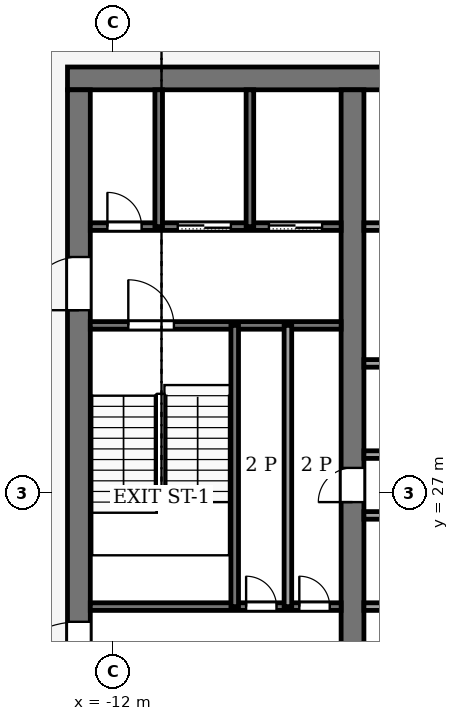
"""IFC4 building model, lengths in metres.
Left out: names, types, materials, properties, quantities, classifications, styles, units other than length and angle.
Written with IfcOpenShell. Run it as: python <this file> out.ifc"""

import sys

from ifc_helpers import new_model, si_unit, direction, frame, frame_2d, origin, place, context, subcontext, project, spatial, rectangle, extrude, element, fill, save


model = new_model("IFC4")
c1 = context("Model", 3, precision=1e-05, world=origin(), true_north=direction((0.0, 1.0)))
c2 = subcontext(c1, "Body", "Model", "MODEL_VIEW")
j1 = project(units=[si_unit("LENGTHUNIT", "METRE"), si_unit("PLANEANGLEUNIT", "RADIAN")], contexts=[c1])
p1 = place(None, origin())
s1 = spatial("IfcSite", under=j1, at=p1, CompositionType="ELEMENT")
p2 = place(p1, origin())
s2 = spatial("IfcBuilding", under=s1, at=p2, CompositionType="ELEMENT")
p3 = place(p2, frame((0.0, 0.0, 314.0)))
s3 = spatial("IfcBuildingStorey", under=s2, at=p3, CompositionType="ELEMENT", Elevation=314.0)
p4 = place(p3, frame((-13.2, 37.9, -0.13), z_axis=(0.0, 0.0, 1.0), x_axis=(1.0, 0.0, 0.0)))
e1 = element("IfcWall", 1, at=p4, inside=s3, PredefinedType="SHEAR", context=c2, shape_type="SweptSolid", body=[
    extrude(rectangle(XDim=26.4, YDim=0.6, at=frame_2d((13.2, 0.0))), origin(), (0.0, 0.0, 1.0), 4.0),
])
p5 = place(p3, frame((-12.9, 18.4, -0.13), z_axis=(0.0, 0.0, 1.0), x_axis=(0.0, 1.0, 0.0)))
e2 = element("IfcWall", 2, at=p5, inside=s3, PredefinedType="SHEAR", context=c2, shape_type="SweptSolid", body=[
    extrude(rectangle(XDim=19.2, YDim=0.6, at=frame_2d((9.6, 0.0))), origin(), (0.0, 0.0, 1.0), 4.0),
])
p6 = place(p5, frame((2.8, 0.0, 0.13)))
e3 = element("IfcOpeningElement", 3, at=p6, cuts=e2, PredefinedType="OPENING", context=c2, shape_type="SweptSolid", body=[
    extrude(rectangle(XDim=2.4, YDim=2.4, at=frame_2d((1.2, 1.2))), frame((0.0, 0.31, 0.0), z_axis=(0.0, -1.0, 0.0), x_axis=(1.0, 0.0, 0.0)), (0.0, 0.0, 1.0), 0.62),
])
p7 = place(p5, frame((13.4, 0.0, 0.13)))
e4 = element("IfcOpeningElement", 4, at=p7, cuts=e2, PredefinedType="OPENING", context=c2, shape_type="SweptSolid", body=[
    extrude(rectangle(XDim=1.4, YDim=2.2, at=frame_2d((0.7, 1.1))), frame((0.0, 0.31, 0.0), z_axis=(0.0, -1.0, 0.0), x_axis=(1.0, 0.0, 0.0)), (0.0, 0.0, 1.0), 0.62),
])
p8 = place(p3, frame((-5.7, 18.4, -0.13), z_axis=(0.0, 0.0, 1.0), x_axis=(0.0, 1.0, 0.0)))
e5 = element("IfcWall", 5, at=p8, inside=s3, PredefinedType="SHEAR", context=c2, shape_type="SweptSolid", body=[
    extrude(rectangle(XDim=19.2, YDim=0.6, at=frame_2d((9.6, 0.0))), origin(), (0.0, 0.0, 1.0), 4.0),
])
p9 = place(p8, frame((8.35, 0.0, 0.13)))
e6 = element("IfcOpeningElement", 6, at=p9, cuts=e5, PredefinedType="OPENING", context=c2, shape_type="SweptSolid", body=[
    extrude(rectangle(XDim=0.9, YDim=2.1, at=frame_2d((0.45, 1.05))), frame((0.0, 0.31, 0.0), z_axis=(0.0, -1.0, 0.0), x_axis=(1.0, 0.0, 0.0)), (0.0, 0.0, 1.0), 0.62),
])
p10 = place(p3, frame((-12.6, 24.0, 0.0), z_axis=(0.0, 0.0, 1.0), x_axis=(1.0, 0.0, 0.0)))
e7 = element("IfcWall", 7, at=p10, inside=s3, PredefinedType="PARTITIONING", context=c2, shape_type="SweptSolid", body=[
    extrude(rectangle(XDim=6.6, YDim=0.2, at=frame_2d((3.3, 0.0))), origin(), (0.0, 0.0, 1.0), 3.87),
])
p11 = place(p10, frame((4.1, 0.0, 0.0)))
e8 = element("IfcOpeningElement", 8, at=p11, cuts=e7, PredefinedType="OPENING", context=c2, shape_type="SweptSolid", body=[
    extrude(rectangle(XDim=0.8, YDim=2.1, at=frame_2d((0.4, 1.05))), frame((0.0, 0.11, 0.0), z_axis=(0.0, -1.0, 0.0), x_axis=(1.0, 0.0, 0.0)), (0.0, 0.0, 1.0), 0.22),
])
p12 = place(p10, frame((5.5, 0.0, 0.0)))
e9 = element("IfcOpeningElement", 9, at=p12, cuts=e7, PredefinedType="OPENING", context=c2, shape_type="SweptSolid", body=[
    extrude(rectangle(XDim=0.8, YDim=2.1, at=frame_2d((0.4, 1.05))), frame((0.0, 0.11, 0.0), z_axis=(0.0, -1.0, 0.0), x_axis=(1.0, 0.0, 0.0)), (0.0, 0.0, 1.0), 0.22),
])
p13 = place(p3, frame((-5.4, 24.0, 0.0), z_axis=(0.0, 0.0, 1.0), x_axis=(1.0, 0.0, 0.0)))
e10 = element("IfcWall", 10, at=p13, inside=s3, PredefinedType="PARTITIONING", context=c2, shape_type="SweptSolid", body=[
    extrude(rectangle(XDim=10.8, YDim=0.2, at=frame_2d((5.4, 0.0))), origin(), (0.0, 0.0, 1.0), 3.87),
])
p14 = place(p13, frame((1.552, 0.0, 0.0)))
e11 = element("IfcOpeningElement", 11, at=p14, cuts=e10, PredefinedType="OPENING", context=c2, shape_type="SweptSolid", body=[
    extrude(rectangle(XDim=1.0, YDim=2.1, at=frame_2d((0.5, 1.05))), frame((0.0, 0.11, 0.0), z_axis=(0.0, -1.0, 0.0), x_axis=(1.0, 0.0, 0.0)), (0.0, 0.0, 1.0), 0.22),
])
p15 = place(p13, frame((6.952, 0.0, 0.0)))
e12 = element("IfcOpeningElement", 12, at=p15, cuts=e10, PredefinedType="OPENING", context=c2, shape_type="SweptSolid", body=[
    extrude(rectangle(XDim=1.0, YDim=2.1, at=frame_2d((0.5, 1.05))), frame((0.0, 0.11, 0.0), z_axis=(0.0, -1.0, 0.0), x_axis=(1.0, 0.0, 0.0)), (0.0, 0.0, 1.0), 0.22),
])
for number, where, z_axis, x_axis in (
    (13, (-5.4, 26.4, 0.0), (0.0, 0.0, 1.0), (1.0, 0.0, 0.0)),
    (14, (-5.4, 28.0, 0.0), (0.0, 0.0, 1.0), (1.0, 0.0, 0.0)),
):
    element("IfcWall", number, at=place(p3, frame(where, z_axis=z_axis, x_axis=x_axis)), inside=s3, PredefinedType="PARTITIONING", context=c2, shape_type="SweptSolid", body=[
        extrude(rectangle(XDim=10.8, YDim=0.2, at=frame_2d((5.4, 0.0))), origin(), (0.0, 0.0, 1.0), 3.87),
    ])
p16 = place(p3, frame((-5.4, 30.4, 0.0), z_axis=(0.0, 0.0, 1.0), x_axis=(1.0, 0.0, 0.0)))
e15 = element("IfcWall", 15, at=p16, inside=s3, PredefinedType="PARTITIONING", context=c2, shape_type="SweptSolid", body=[
    extrude(rectangle(XDim=10.8, YDim=0.2, at=frame_2d((5.4, 0.0))), origin(), (0.0, 0.0, 1.0), 3.87),
])
p17 = place(p16, frame((2.47, 0.0, 0.0)))
e16 = element("IfcOpeningElement", 16, at=p17, cuts=e15, PredefinedType="OPENING", context=c2, shape_type="SweptSolid", body=[
    extrude(rectangle(XDim=1.0, YDim=2.1, at=frame_2d((0.5, 1.05))), frame((0.0, 0.11, 0.0), z_axis=(0.0, -1.0, 0.0), x_axis=(1.0, 0.0, 0.0)), (0.0, 0.0, 1.0), 0.22),
])
p18 = place(p16, frame((7.87, 0.0, 0.0)))
e17 = element("IfcOpeningElement", 17, at=p18, cuts=e15, PredefinedType="OPENING", context=c2, shape_type="SweptSolid", body=[
    extrude(rectangle(XDim=1.0, YDim=2.1, at=frame_2d((0.5, 1.05))), frame((0.0, 0.11, 0.0), z_axis=(0.0, -1.0, 0.0), x_axis=(1.0, 0.0, 0.0)), (0.0, 0.0, 1.0), 0.22),
])
p19 = place(p3, frame((-12.6, 31.4, 0.0), z_axis=(0.0, 0.0, 1.0), x_axis=(1.0, 0.0, 0.0)))
e18 = element("IfcWall", 18, at=p19, inside=s3, PredefinedType="PARTITIONING", context=c2, shape_type="SweptSolid", body=[
    extrude(rectangle(XDim=6.6, YDim=0.2, at=frame_2d((3.3, 0.0))), origin(), (0.0, 0.0, 1.0), 3.87),
])
p20 = place(p19, frame((1.0, 0.0, 0.0)))
e19 = element("IfcOpeningElement", 19, at=p20, cuts=e18, PredefinedType="OPENING", context=c2, shape_type="SweptSolid", body=[
    extrude(rectangle(XDim=1.2, YDim=2.2, at=frame_2d((0.6, 1.1))), frame((0.0, 0.11, 0.0), z_axis=(0.0, -1.0, 0.0), x_axis=(1.0, 0.0, 0.0)), (0.0, 0.0, 1.0), 0.22),
])
p21 = place(p3, frame((-12.6, 34.0, 0.0), z_axis=(0.0, 0.0, 1.0), x_axis=(1.0, 0.0, 0.0)))
e20 = element("IfcWall", 20, at=p21, inside=s3, PredefinedType="PARTITIONING", context=c2, shape_type="SweptSolid", body=[
    extrude(rectangle(XDim=6.6, YDim=0.2, at=frame_2d((3.3, 0.0))), origin(), (0.0, 0.0, 1.0), 3.87),
])
p22 = place(p21, frame((4.7, 0.0, 0.0)))
e21 = element("IfcOpeningElement", 21, at=p22, cuts=e20, PredefinedType="OPENING", context=c2, shape_type="SweptSolid", body=[
    extrude(rectangle(XDim=1.4, YDim=2.2, at=frame_2d((0.7, 1.1))), frame((0.0, 0.11, 0.0), z_axis=(0.0, -1.0, 0.0), x_axis=(1.0, 0.0, 0.0)), (0.0, 0.0, 1.0), 0.22),
])
p23 = place(p21, frame((2.3, 0.0, 0.0)))
e22 = element("IfcOpeningElement", 22, at=p23, cuts=e20, PredefinedType="OPENING", context=c2, shape_type="SweptSolid", body=[
    extrude(rectangle(XDim=1.4, YDim=2.2, at=frame_2d((0.7, 1.1))), frame((0.0, 0.11, 0.0), z_axis=(0.0, -1.0, 0.0), x_axis=(1.0, 0.0, 0.0)), (0.0, 0.0, 1.0), 0.22),
])
p24 = place(p21, frame((0.45, 0.0, 0.0)))
e23 = element("IfcOpeningElement", 23, at=p24, cuts=e20, PredefinedType="OPENING", context=c2, shape_type="SweptSolid", body=[
    extrude(rectangle(XDim=0.9, YDim=2.1, at=frame_2d((0.45, 1.05))), frame((0.0, 0.11, 0.0), z_axis=(0.0, -1.0, 0.0), x_axis=(1.0, 0.0, 0.0)), (0.0, 0.0, 1.0), 0.22),
])
p25 = place(p3, frame((-5.4, 34.0, 0.0), z_axis=(0.0, 0.0, 1.0), x_axis=(1.0, 0.0, 0.0)))
e24 = element("IfcWall", 24, at=p25, inside=s3, PredefinedType="PARTITIONING", context=c2, shape_type="SweptSolid", body=[
    extrude(rectangle(XDim=10.8, YDim=0.2, at=frame_2d((5.4, 0.0))), origin(), (0.0, 0.0, 1.0), 3.87),
])
p26 = place(p25, frame((6.15, 0.0, 0.0)))
e25 = element("IfcOpeningElement", 25, at=p26, cuts=e24, PredefinedType="OPENING", context=c2, shape_type="SweptSolid", body=[
    extrude(rectangle(XDim=1.2, YDim=2.2, at=frame_2d((0.6, 1.1))), frame((0.0, 0.11, 0.0), z_axis=(0.0, -1.0, 0.0), x_axis=(1.0, 0.0, 0.0)), (0.0, 0.0, 1.0), 0.22),
])
p27 = place(p25, frame((8.95, 0.0, 0.0)))
e26 = element("IfcOpeningElement", 26, at=p27, cuts=e24, PredefinedType="OPENING", context=c2, shape_type="SweptSolid", body=[
    extrude(rectangle(XDim=1.0, YDim=2.1, at=frame_2d((0.5, 1.05))), frame((0.0, 0.11, 0.0), z_axis=(0.0, -1.0, 0.0), x_axis=(1.0, 0.0, 0.0)), (0.0, 0.0, 1.0), 0.22),
])
p28 = place(p3, frame((-10.8, 34.0, 0.0), z_axis=(0.0, 0.0, 1.0), x_axis=(0.0, 1.0, 0.0)))
e27 = element("IfcWall", 27, at=p28, inside=s3, PredefinedType="PARTITIONING", context=c2, shape_type="SweptSolid", body=[
    extrude(rectangle(XDim=3.6, YDim=0.2, at=frame_2d((1.8, 0.0))), origin(), (0.0, 0.0, 1.0), 3.87),
])
p29 = place(p3, frame((-8.8, 24.0, 0.0), z_axis=(0.0, 0.0, 1.0), x_axis=(0.0, 1.0, 0.0)))
e28 = element("IfcWall", 28, at=p29, inside=s3, PredefinedType="PARTITIONING", context=c2, shape_type="SweptSolid", body=[
    extrude(rectangle(XDim=7.4, YDim=0.2, at=frame_2d((3.7, 0.0))), origin(), (0.0, 0.0, 1.0), 3.87),
])
p30 = place(p3, frame((-8.4, 34.0, 0.0), z_axis=(0.0, 0.0, 1.0), x_axis=(0.0, 1.0, 0.0)))
e29 = element("IfcWall", 29, at=p30, inside=s3, PredefinedType="PARTITIONING", context=c2, shape_type="SweptSolid", body=[
    extrude(rectangle(XDim=3.6, YDim=0.2, at=frame_2d((1.8, 0.0))), origin(), (0.0, 0.0, 1.0), 3.87),
])
p31 = place(p3, frame((-7.4, 24.0, 0.0), z_axis=(0.0, 0.0, 1.0), x_axis=(0.0, 1.0, 0.0)))
e30 = element("IfcWall", 30, at=p31, inside=s3, PredefinedType="PARTITIONING", context=c2, shape_type="SweptSolid", body=[
    extrude(rectangle(XDim=7.4, YDim=0.2, at=frame_2d((3.7, 0.0))), origin(), (0.0, 0.0, 1.0), 3.87),
])
p32 = place(p22, origin())
e31 = element("IfcDoor", 31, at=p32, inside=s3, OperationType="SLIDING_TO_LEFT", PredefinedType="DOOR", context=c2, shape_type="SweptSolid", body=[
    extrude(rectangle(XDim=1.4, YDim=2.2, at=frame_2d((0.7, 1.1))), frame((0.0, 0.025, 0.0), z_axis=(0.0, -1.0, 0.0), x_axis=(1.0, 0.0, 0.0)), (0.0, 0.0, 1.0), 0.05),
])
fill(e21, e31)
p33 = place(p23, origin())
e32 = element("IfcDoor", 32, at=p33, inside=s3, OperationType="SLIDING_TO_LEFT", PredefinedType="DOOR", context=c2, shape_type="SweptSolid", body=[
    extrude(rectangle(XDim=1.4, YDim=2.2, at=frame_2d((0.7, 1.1))), frame((0.0, 0.025, 0.0), z_axis=(0.0, -1.0, 0.0), x_axis=(1.0, 0.0, 0.0)), (0.0, 0.0, 1.0), 0.05),
])
fill(e22, e32)
p34 = place(p24, origin())
e33 = element("IfcDoor", 33, at=p34, inside=s3, OperationType="SINGLE_SWING_RIGHT", PredefinedType="DOOR", context=c2, shape_type="SweptSolid", body=[
    extrude(rectangle(XDim=0.9, YDim=2.1, at=frame_2d((0.45, 1.05))), frame((0.0, 0.025, 0.0), z_axis=(0.0, -1.0, 0.0), x_axis=(1.0, 0.0, 0.0)), (0.0, 0.0, 1.0), 0.05),
])
fill(e23, e33)
p35 = place(p11, origin())
e34 = element("IfcDoor", 34, at=p35, inside=s3, OperationType="SINGLE_SWING_LEFT", PredefinedType="DOOR", context=c2, shape_type="SweptSolid", body=[
    extrude(rectangle(XDim=0.8, YDim=2.1, at=frame_2d((0.4, 1.05))), frame((0.0, 0.025, 0.0), z_axis=(0.0, -1.0, 0.0), x_axis=(1.0, 0.0, 0.0)), (0.0, 0.0, 1.0), 0.05),
])
fill(e8, e34)
p36 = place(p12, origin())
e35 = element("IfcDoor", 35, at=p36, inside=s3, OperationType="SINGLE_SWING_RIGHT", PredefinedType="DOOR", context=c2, shape_type="SweptSolid", body=[
    extrude(rectangle(XDim=0.8, YDim=2.1, at=frame_2d((0.4, 1.05))), frame((0.0, 0.025, 0.0), z_axis=(0.0, -1.0, 0.0), x_axis=(1.0, 0.0, 0.0)), (0.0, 0.0, 1.0), 0.05),
])
fill(e9, e35)
p37 = place(p9, origin())
e36 = element("IfcDoor", 36, at=p37, inside=s3, OperationType="SINGLE_SWING_LEFT", PredefinedType="DOOR", context=c2, shape_type="SweptSolid", body=[
    extrude(rectangle(XDim=0.9, YDim=2.1, at=frame_2d((0.45, 1.05))), frame((0.0, 0.025, 0.0), z_axis=(0.0, -1.0, 0.0), x_axis=(1.0, 0.0, 0.0)), (0.0, 0.0, 1.0), 0.05),
])
fill(e6, e36)
p38 = place(p20, origin())
e37 = element("IfcDoor", 37, at=p38, inside=s3, OperationType="SINGLE_SWING_RIGHT", PredefinedType="DOOR", context=c2, shape_type="SweptSolid", body=[
    extrude(rectangle(XDim=1.2, YDim=2.2, at=frame_2d((0.6, 1.1))), frame((0.0, 0.025, 0.0), z_axis=(0.0, -1.0, 0.0), x_axis=(1.0, 0.0, 0.0)), (0.0, 0.0, 1.0), 0.05),
])
fill(e19, e37)
p39 = place(p6, origin())
e38 = element("IfcDoor", 38, at=p39, inside=s3, OperationType="DOUBLE_DOOR_SINGLE_SWING", PredefinedType="DOOR", context=c2, shape_type="SweptSolid", body=[
    extrude(rectangle(XDim=2.4, YDim=2.4, at=frame_2d((1.2, 1.2))), frame((0.0, 0.025, 0.0), z_axis=(0.0, -1.0, 0.0), x_axis=(1.0, 0.0, 0.0)), (0.0, 0.0, 1.0), 0.05),
])
fill(e3, e38)
p40 = place(p7, origin())
e39 = element("IfcDoor", 39, at=p40, inside=s3, OperationType="SINGLE_SWING_RIGHT", PredefinedType="DOOR", context=c2, shape_type="SweptSolid", body=[
    extrude(rectangle(XDim=1.4, YDim=2.2, at=frame_2d((0.7, 1.1))), frame((0.0, 0.025, 0.0), z_axis=(0.0, -1.0, 0.0), x_axis=(1.0, 0.0, 0.0)), (0.0, 0.0, 1.0), 0.05),
])
fill(e4, e39)
save(model, sys.argv[1])
